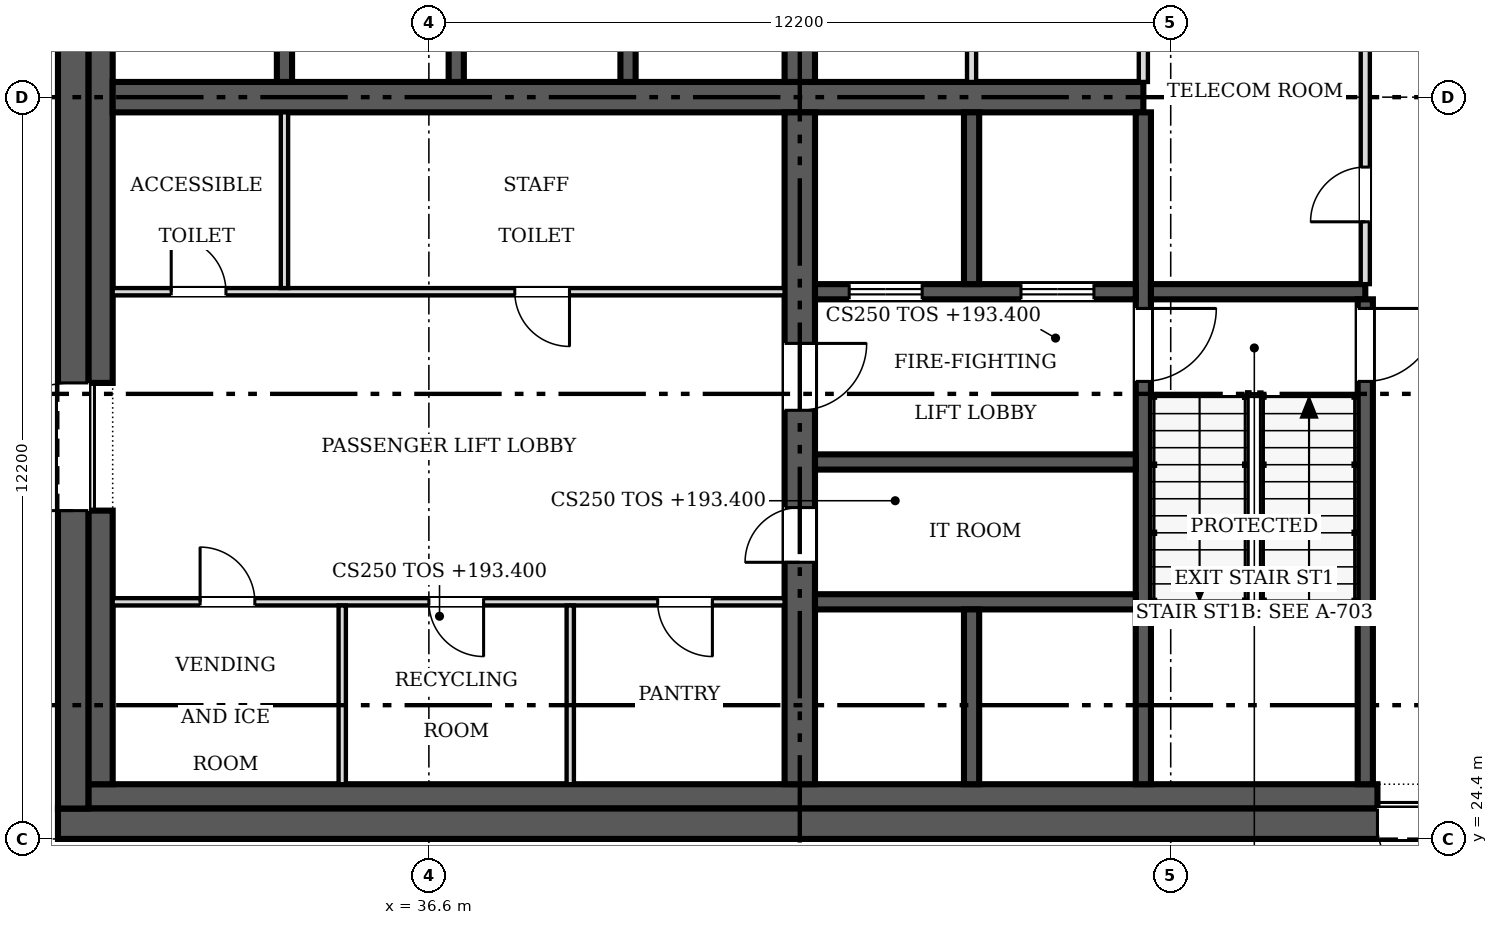
"""IFC4 building model, lengths in metres.
Left out: names, types, materials, properties, quantities, classifications, styles, units other than length and angle.
Written with IfcOpenShell. Run it as: python <this file> out.ifc"""

import sys

from ifc_helpers import new_model, si_unit, direction, frame, frame_2d, origin, place, context, subcontext, project, spatial, rectangle, extrude, source, transform, mapped, element, fill, save


model = new_model("IFC4")
c1 = context("Model", 3, precision=1e-05, world=origin(), true_north=direction((0.0, 1.0)))
c2 = subcontext(c1, "Body", "Model", "MODEL_VIEW")
j1 = project(units=[si_unit("LENGTHUNIT", "METRE"), si_unit("PLANEANGLEUNIT", "RADIAN")], contexts=[c1])
p1 = place(None, origin())
s1 = spatial("IfcSite", under=j1, at=p1, CompositionType="ELEMENT")
p2 = place(p1, origin())
s2 = spatial("IfcBuilding", under=s1, at=p2, CompositionType="ELEMENT")
p3 = place(p2, frame((0.0, 0.0, 193.4)))
s3 = spatial("IfcBuildingStorey", under=s2, at=p3, CompositionType="ELEMENT", Elevation=193.4)
p4 = place(p3, frame((54.9, 24.65, 0.0), z_axis=(0.0, 0.0, 1.0), x_axis=(-1.0, 0.0, 0.0)))
e1 = element("IfcWall", 1, at=p4, inside=s3, PredefinedType="SHEAR", context=c2, shape_type="SweptSolid", body=[
    extrude(rectangle(XDim=24.4, YDim=0.5, at=frame_2d((12.2, 0.0))), origin(), (0.0, 0.0, 1.0), 4.5),
])
m1 = source(origin(), c2, "Body", "SweptSolid", [
    extrude(rectangle(XDim=1.2, YDim=2.1, at=frame_2d((0.6, 1.05))), frame((0.0, 0.26, 0.0), z_axis=(0.0, -1.0, 0.0), x_axis=(1.0, 0.0, 0.0)), (0.0, 0.0, 1.0), 0.52),
])
p5 = place(p4, frame((1.5, 0.0, 0.0)))
e2 = element("IfcOpeningElement", 2, at=p5, cuts=e1, PredefinedType="OPENING", context=c2, shape_type="MappedRepresentation", body=[
    mapped(m1, transform((0.0, 0.0, 0.0), scale=1.0)),
])
p6 = place(p3, frame((30.75, 24.9, 0.0), z_axis=(0.0, 0.0, 1.0), x_axis=(0.0, 1.0, 0.0)))
e3 = element("IfcWall", 3, at=p6, inside=s3, PredefinedType="SHEAR", context=c2, shape_type="SweptSolid", body=[
    extrude(rectangle(XDim=23.4, YDim=0.5, at=frame_2d((11.7, 0.0))), origin(), (0.0, 0.0, 1.0), 4.5),
])
m2 = source(origin(), c2, "Body", "SweptSolid", [
    extrude(rectangle(XDim=2.1, YDim=2.4, at=frame_2d((1.05, 1.2))), frame((0.0, 0.26, 0.0), z_axis=(0.0, -1.0, 0.0), x_axis=(1.0, 0.0, 0.0)), (0.0, 0.0, 1.0), 0.52),
])
p7 = place(p6, frame((4.9, 0.0, 0.0)))
e4 = element("IfcOpeningElement", 4, at=p7, cuts=e3, PredefinedType="OPENING", context=c2, shape_type="MappedRepresentation", body=[
    mapped(m2, transform((0.0, 0.0, 0.0), scale=1.0)),
])
p8 = place(p6, frame((16.4, 0.0, 0.0)))
e5 = element("IfcOpeningElement", 5, at=p8, cuts=e3, PredefinedType="OPENING", context=c2, shape_type="MappedRepresentation", body=[
    mapped(m2, transform((0.0, 0.0, 0.0), scale=1.0)),
])
p9 = place(p3, frame((31.0, 25.1, 0.0), z_axis=(0.0, 0.0, 1.0), x_axis=(1.0, 0.0, 0.0)))
e6 = element("IfcWall", 6, at=p9, inside=s3, PredefinedType="SOLIDWALL", context=c2, shape_type="SweptSolid", body=[
    extrude(rectangle(XDim=21.2, YDim=0.4, at=frame_2d((10.6, 0.0))), origin(), (0.0, 0.0, 1.0), 4.5),
])
p10 = place(p3, frame((31.2, 25.3, 0.0), z_axis=(0.0, 0.0, 1.0), x_axis=(0.0, 1.0, 0.0)))
e7 = element("IfcWall", 7, at=p10, inside=s3, PredefinedType="SOLIDWALL", context=c2, shape_type="SweptSolid", body=[
    extrude(rectangle(XDim=4.5, YDim=0.4, at=frame_2d((2.25, 0.0))), origin(), (0.0, 0.0, 1.0), 4.5),
])
p11 = place(p3, frame((31.2, 31.9, 0.0), z_axis=(0.0, 0.0, 1.0), x_axis=(0.0, 1.0, 0.0)))
e8 = element("IfcWall", 8, at=p11, inside=s3, PredefinedType="SOLIDWALL", context=c2, shape_type="SweptSolid", body=[
    extrude(rectangle(XDim=9.4, YDim=0.4, at=frame_2d((4.7, 0.0))), origin(), (0.0, 0.0, 1.0), 4.5),
])
p12 = place(p3, frame((31.4, 36.6, 0.0), z_axis=(0.0, 0.0, 1.0), x_axis=(1.0, 0.0, 0.0)))
e9 = element("IfcWall", 9, at=p12, inside=s3, PredefinedType="SHEAR", context=c2, shape_type="SweptSolid", body=[
    extrude(rectangle(XDim=16.95, YDim=0.5, at=frame_2d((8.475, 0.0))), origin(), (0.0, 0.0, 1.0), 4.5),
])
p13 = place(p3, frame((42.7, 36.35, 0.0), z_axis=(0.0, 0.0, 1.0), x_axis=(0.0, -1.0, 0.0)))
e10 = element("IfcWall", 10, at=p13, inside=s3, PredefinedType="SHEAR", context=c2, shape_type="SweptSolid", body=[
    extrude(rectangle(XDim=11.05, YDim=0.5, at=frame_2d((5.525, 0.0))), origin(), (0.0, 0.0, 1.0), 4.5),
])
m3 = source(origin(), c2, "Body", "SweptSolid", [
    extrude(rectangle(XDim=0.9, YDim=2.1, at=frame_2d((0.45, 1.05))), frame((0.0, 0.26, 0.0), z_axis=(0.0, -1.0, 0.0), x_axis=(1.0, 0.0, 0.0)), (0.0, 0.0, 1.0), 0.52),
])
p14 = place(p13, frame((6.5, 0.0, 0.0)))
e11 = element("IfcOpeningElement", 11, at=p14, cuts=e10, PredefinedType="OPENING", context=c2, shape_type="MappedRepresentation", body=[
    mapped(m3, transform((0.0, 0.0, 0.0), scale=1.0)),
])
m4 = source(origin(), c2, "Body", "SweptSolid", [
    extrude(rectangle(XDim=1.1, YDim=2.1, at=frame_2d((0.55, 1.05))), frame((0.0, 0.26, 0.0), z_axis=(0.0, -1.0, 0.0), x_axis=(1.0, 0.0, 0.0)), (0.0, 0.0, 1.0), 0.52),
])
p15 = place(p13, frame((3.8, 0.0, 0.0)))
e12 = element("IfcOpeningElement", 12, at=p15, cuts=e10, PredefinedType="OPENING", context=c2, shape_type="MappedRepresentation", body=[
    mapped(m4, transform((0.0, 0.0, 0.0), scale=1.0)),
])
p16 = place(p3, frame((42.7, 36.85, 0.0), z_axis=(0.0, 0.0, 1.0), x_axis=(0.0, 1.0, 0.0)))
e13 = element("IfcWall", 13, at=p16, inside=s3, PredefinedType="SHEAR", context=c2, shape_type="SweptSolid", body=[
    extrude(rectangle(XDim=2.95, YDim=0.5, at=frame_2d((1.475, 0.0))), origin(), (0.0, 0.0, 1.0), 4.5),
])
p17 = place(p3, frame((48.35, 36.35, 0.0), z_axis=(0.0, 0.0, 1.0), x_axis=(0.0, -1.0, 0.0)))
e14 = element("IfcWall", 14, at=p17, inside=s3, PredefinedType="SOLIDWALL", context=c2, shape_type="SweptSolid", body=[
    extrude(rectangle(XDim=11.05, YDim=0.25, at=frame_2d((5.525, 0.0))), origin(), (0.0, 0.0, 1.0), 4.5),
])
m5 = source(origin(), c2, "Body", "SweptSolid", [
    extrude(rectangle(XDim=1.2, YDim=2.1, at=frame_2d((0.6, 1.05))), frame((0.0, 0.135, 0.0), z_axis=(0.0, -1.0, 0.0), x_axis=(1.0, 0.0, 0.0)), (0.0, 0.0, 1.0), 0.27),
])
p18 = place(p17, frame((3.225, 0.0, 0.0)))
e15 = element("IfcOpeningElement", 15, at=p18, cuts=e14, PredefinedType="OPENING", context=c2, shape_type="MappedRepresentation", body=[
    mapped(m5, transform((0.0, 0.0, 0.0), scale=1.0)),
])
p19 = place(p3, frame((48.225, 33.4, 0.0), z_axis=(0.0, 0.0, 1.0), x_axis=(-1.0, 0.0, 0.0)))
e16 = element("IfcWall", 16, at=p19, inside=s3, PredefinedType="SOLIDWALL", context=c2, shape_type="SweptSolid", body=[
    extrude(rectangle(XDim=5.275, YDim=0.25, at=frame_2d((2.638, 0.0))), origin(), (0.0, 0.0, 1.0), 4.5),
])
p20 = place(p19, frame((3.512, 0.0, 0.0)))
e17 = element("IfcOpeningElement", 17, at=p20, cuts=e16, PredefinedType="OPENING", context=c2, shape_type="MappedRepresentation", body=[
    mapped(m5, transform((0.0, 0.0, 0.0), scale=1.0)),
])
p21 = place(p19, frame((0.688, 0.0, 0.0)))
e18 = element("IfcOpeningElement", 18, at=p21, cuts=e16, PredefinedType="OPENING", context=c2, shape_type="MappedRepresentation", body=[
    mapped(m5, transform((0.0, 0.0, 0.0), scale=1.0)),
])
p22 = place(p3, frame((48.475, 33.4, 0.0), z_axis=(0.0, 0.0, 1.0), x_axis=(1.0, 0.0, 0.0)))
e19 = element("IfcWall", 19, at=p22, inside=s3, PredefinedType="SOLIDWALL", context=c2, shape_type="SweptSolid", body=[
    extrude(rectangle(XDim=3.525, YDim=0.25, at=frame_2d((1.762, 0.0))), origin(), (0.0, 0.0, 1.0), 4.5),
])
p23 = place(p3, frame((52.0, 25.3, 0.0), z_axis=(0.0, 0.0, 1.0), x_axis=(0.0, 1.0, 0.0)))
e20 = element("IfcWall", 20, at=p23, inside=s3, PredefinedType="SOLIDWALL", context=c2, shape_type="SweptSolid", body=[
    extrude(rectangle(XDim=7.975, YDim=0.25, at=frame_2d((3.987, 0.0))), origin(), (0.0, 0.0, 1.0), 4.5),
])
p24 = place(p23, frame((6.625, 0.0, 0.0)))
e21 = element("IfcOpeningElement", 21, at=p24, cuts=e20, PredefinedType="OPENING", context=c2, shape_type="MappedRepresentation", body=[
    mapped(m5, transform((0.0, 0.0, 0.0), scale=1.0)),
])
for number, where, z_axis, x_axis in (
    (22, (42.95, 28.3, 0.0), (0.0, 0.0, 1.0), (1.0, 0.0, 0.0)),
    (23, (42.95, 30.6, 0.0), (0.0, 0.0, 1.0), (1.0, 0.0, 0.0)),
):
    element("IfcWall", number, at=place(p3, frame(where, z_axis=z_axis, x_axis=x_axis)), inside=s3, PredefinedType="SOLIDWALL", context=c2, shape_type="SweptSolid", body=[
        extrude(rectangle(XDim=5.275, YDim=0.25, at=frame_2d((2.638, 0.0))), origin(), (0.0, 0.0, 1.0), 4.5),
    ])
for number, where, z_axis, x_axis in (
    (24, (34.225, 36.85, 0.0), (0.0, 0.0, 1.0), (0.0, 1.0, 0.0)),
    (25, (37.05, 36.85, 0.0), (0.0, 0.0, 1.0), (0.0, 1.0, 0.0)),
    (26, (39.875, 36.85, 0.0), (0.0, 0.0, 1.0), (0.0, 1.0, 0.0)),
):
    element("IfcWall", number, at=place(p3, frame(where, z_axis=z_axis, x_axis=x_axis)), inside=s3, PredefinedType="SOLIDWALL", context=c2, shape_type="SweptSolid", body=[
        extrude(rectangle(XDim=2.825, YDim=0.25, at=frame_2d((1.413, 0.0))), origin(), (0.0, 0.0, 1.0), 4.5),
    ])
p25 = place(p3, frame((45.525, 33.525, 0.0), z_axis=(0.0, 0.0, 1.0), x_axis=(0.0, 1.0, 0.0)))
e27 = element("IfcWall", 27, at=p25, inside=s3, PredefinedType="SOLIDWALL", context=c2, shape_type="SweptSolid", body=[
    extrude(rectangle(XDim=2.825, YDim=0.25, at=frame_2d((1.413, 0.0))), origin(), (0.0, 0.0, 1.0), 4.5),
])
p26 = place(p3, frame((45.525, 25.3, 0.0), z_axis=(0.0, 0.0, 1.0), x_axis=(0.0, 1.0, 0.0)))
e28 = element("IfcWall", 28, at=p26, inside=s3, PredefinedType="SOLIDWALL", context=c2, shape_type="SweptSolid", body=[
    extrude(rectangle(XDim=2.875, YDim=0.25, at=frame_2d((1.438, 0.0))), origin(), (0.0, 0.0, 1.0), 4.5),
])
p27 = place(p3, frame((42.45, 28.3, 0.0), z_axis=(0.0, 0.0, 1.0), x_axis=(-1.0, 0.0, 0.0)))
e29 = element("IfcWall", 29, at=p27, inside=s3, PredefinedType="PARTITIONING", context=c2, shape_type="SweptSolid", body=[
    extrude(rectangle(XDim=11.05, YDim=0.12, at=frame_2d((5.525, 0.0))), origin(), (0.0, 0.0, 1.0), 4.3),
])
m6 = source(origin(), c2, "Body", "SweptSolid", [
    extrude(rectangle(XDim=0.9, YDim=2.1, at=frame_2d((0.45, 1.05))), frame((0.0, 0.07, 0.0), z_axis=(0.0, -1.0, 0.0), x_axis=(1.0, 0.0, 0.0)), (0.0, 0.0, 1.0), 0.14),
])
p28 = place(p27, frame((8.712, 0.0, 0.0)))
e30 = element("IfcOpeningElement", 30, at=p28, cuts=e29, PredefinedType="OPENING", context=c2, shape_type="MappedRepresentation", body=[
    mapped(m6, transform((0.0, 0.0, 0.0), scale=1.0)),
])
p29 = place(p27, frame((4.95, 0.0, 0.0)))
e31 = element("IfcOpeningElement", 31, at=p29, cuts=e29, PredefinedType="OPENING", context=c2, shape_type="MappedRepresentation", body=[
    mapped(m6, transform((0.0, 0.0, 0.0), scale=1.0)),
])
p30 = place(p27, frame((1.188, 0.0, 0.0)))
e32 = element("IfcOpeningElement", 32, at=p30, cuts=e29, PredefinedType="OPENING", context=c2, shape_type="MappedRepresentation", body=[
    mapped(m6, transform((0.0, 0.0, 0.0), scale=1.0)),
])
p31 = place(p3, frame((31.4, 33.4, 0.0), z_axis=(0.0, 0.0, 1.0), x_axis=(1.0, 0.0, 0.0)))
e33 = element("IfcWall", 33, at=p31, inside=s3, PredefinedType="PARTITIONING", context=c2, shape_type="SweptSolid", body=[
    extrude(rectangle(XDim=11.05, YDim=0.12, at=frame_2d((5.525, 0.0))), origin(), (0.0, 0.0, 1.0), 4.3),
])
p32 = place(p31, frame((0.962, 0.0, 0.0)))
e34 = element("IfcOpeningElement", 34, at=p32, cuts=e33, PredefinedType="OPENING", context=c2, shape_type="MappedRepresentation", body=[
    mapped(m6, transform((0.0, 0.0, 0.0), scale=1.0)),
])
p33 = place(p31, frame((6.613, 0.0, 0.0)))
e35 = element("IfcOpeningElement", 35, at=p33, cuts=e33, PredefinedType="OPENING", context=c2, shape_type="MappedRepresentation", body=[
    mapped(m6, transform((0.0, 0.0, 0.0), scale=1.0)),
])
p34 = place(p3, frame((52.0, 33.525, 0.0), z_axis=(0.0, 0.0, 1.0), x_axis=(0.0, 1.0, 0.0)))
e36 = element("IfcWall", 36, at=p34, inside=s3, PredefinedType="PARTITIONING", context=c2, shape_type="SweptSolid", body=[
    extrude(rectangle(XDim=6.275, YDim=0.15, at=frame_2d((3.138, 0.0))), origin(), (0.0, 0.0, 1.0), 4.3),
])
m7 = source(origin(), c2, "Body", "SweptSolid", [
    extrude(rectangle(XDim=0.9, YDim=2.1, at=frame_2d((0.45, 1.05))), frame((0.0, 0.085, 0.0), z_axis=(0.0, -1.0, 0.0), x_axis=(1.0, 0.0, 0.0)), (0.0, 0.0, 1.0), 0.17),
])
p35 = place(p34, frame((1.025, 0.0, 0.0)))
e37 = element("IfcOpeningElement", 37, at=p35, cuts=e36, PredefinedType="OPENING", context=c2, shape_type="MappedRepresentation", body=[
    mapped(m7, transform((0.0, 0.0, 0.0), scale=1.0)),
])
for number, where, z_axis, x_axis in (
    (38, (45.525, 36.85, 0.0), (0.0, 0.0, 1.0), (0.0, 1.0, 0.0)),
    (39, (48.35, 36.85, 0.0), (0.0, 0.0, 1.0), (0.0, 1.0, 0.0)),
):
    element("IfcWall", number, at=place(p3, frame(where, z_axis=z_axis, x_axis=x_axis)), inside=s3, PredefinedType="PARTITIONING", context=c2, shape_type="SweptSolid", body=[
        extrude(rectangle(XDim=2.95, YDim=0.15, at=frame_2d((1.475, 0.0))), origin(), (0.0, 0.0, 1.0), 4.3),
    ])
p36 = place(p3, frame((34.225, 33.46, 0.0), z_axis=(0.0, 0.0, 1.0), x_axis=(0.0, 1.0, 0.0)))
e40 = element("IfcWall", 40, at=p36, inside=s3, PredefinedType="PARTITIONING", context=c2, shape_type="SweptSolid", body=[
    extrude(rectangle(XDim=2.89, YDim=0.12, at=frame_2d((1.445, 0.0))), origin(), (0.0, 0.0, 1.0), 4.3),
])
for number, where, z_axis, x_axis in (
    (41, (35.175, 25.3, 0.0), (0.0, 0.0, 1.0), (0.0, 1.0, 0.0)),
    (42, (38.925, 25.3, 0.0), (0.0, 0.0, 1.0), (0.0, 1.0, 0.0)),
):
    element("IfcWall", number, at=place(p3, frame(where, z_axis=z_axis, x_axis=x_axis)), inside=s3, PredefinedType="PARTITIONING", context=c2, shape_type="SweptSolid", body=[
        extrude(rectangle(XDim=2.94, YDim=0.12, at=frame_2d((1.47, 0.0))), origin(), (0.0, 0.0, 1.0), 4.3),
    ])
m8 = source(origin(), c2, "Body", "SweptSolid", [
    extrude(rectangle(XDim=1.2, YDim=2.1, at=frame_2d((0.6, 1.05))), frame((0.0, 0.025, 0.0), z_axis=(0.0, -1.0, 0.0), x_axis=(1.0, 0.0, 0.0)), (0.0, 0.0, 1.0), 0.05),
])
p37 = place(p5, origin())
e43 = element("IfcDoor", 43, at=p37, inside=s3, OperationType="SINGLE_SWING_LEFT", PredefinedType="DOOR", context=c2, shape_type="MappedRepresentation", body=[
    mapped(m8, transform((0.0, 0.0, 0.0), scale=1.0)),
])
fill(e2, e43)
m9 = source(origin(), c2, "Body", "SweptSolid", [
    extrude(rectangle(XDim=2.1, YDim=2.4, at=frame_2d((1.05, 1.2))), frame((0.0, 0.025, 0.0), z_axis=(0.0, -1.0, 0.0), x_axis=(1.0, 0.0, 0.0)), (0.0, 0.0, 1.0), 0.05),
])
p38 = place(p7, origin())
e44 = element("IfcDoor", 44, at=p38, inside=s3, OperationType="DOUBLE_DOOR_SINGLE_SWING", PredefinedType="DOOR", context=c2, shape_type="MappedRepresentation", body=[
    mapped(m9, transform((0.0, 0.0, 0.0), scale=1.0)),
])
fill(e4, e44)
m10 = source(origin(), c2, "Body", "SweptSolid", [
    extrude(rectangle(XDim=0.9, YDim=2.1, at=frame_2d((0.45, 1.05))), frame((0.0, 0.025, 0.0), z_axis=(0.0, -1.0, 0.0), x_axis=(1.0, 0.0, 0.0)), (0.0, 0.0, 1.0), 0.05),
])
p39 = place(p14, origin())
e45 = element("IfcDoor", 45, at=p39, inside=s3, OperationType="SINGLE_SWING_RIGHT", PredefinedType="DOOR", context=c2, shape_type="MappedRepresentation", body=[
    mapped(m10, transform((0.0, 0.0, 0.0), scale=1.0)),
])
fill(e11, e45)
m11 = source(origin(), c2, "Body", "SweptSolid", [
    extrude(rectangle(XDim=1.1, YDim=2.1, at=frame_2d((0.55, 1.05))), frame((0.0, 0.025, 0.0), z_axis=(0.0, -1.0, 0.0), x_axis=(1.0, 0.0, 0.0)), (0.0, 0.0, 1.0), 0.05),
])
p40 = place(p15, origin())
e46 = element("IfcDoor", 46, at=p40, inside=s3, OperationType="SINGLE_SWING_LEFT", PredefinedType="DOOR", context=c2, shape_type="MappedRepresentation", body=[
    mapped(m11, transform((0.0, 0.0, 0.0), scale=1.0)),
])
fill(e12, e46)
p41 = place(p18, origin())
e47 = element("IfcDoor", 47, at=p41, inside=s3, OperationType="SINGLE_SWING_LEFT", PredefinedType="DOOR", context=c2, shape_type="MappedRepresentation", body=[
    mapped(m8, transform((0.0, 0.0, 0.0), scale=1.0)),
])
fill(e15, e47)
p42 = place(p20, origin())
e48 = element("IfcDoor", 48, at=p42, inside=s3, OperationType="DOUBLE_DOOR_SLIDING", PredefinedType="DOOR", context=c2, shape_type="MappedRepresentation", body=[
    mapped(m8, transform((0.0, 0.0, 0.0), scale=1.0)),
])
fill(e17, e48)
p43 = place(p21, origin())
e49 = element("IfcDoor", 49, at=p43, inside=s3, OperationType="DOUBLE_DOOR_SLIDING", PredefinedType="DOOR", context=c2, shape_type="MappedRepresentation", body=[
    mapped(m8, transform((0.0, 0.0, 0.0), scale=1.0)),
])
fill(e18, e49)
p44 = place(p24, origin())
e50 = element("IfcDoor", 50, at=p44, inside=s3, OperationType="SINGLE_SWING_RIGHT", PredefinedType="DOOR", context=c2, shape_type="MappedRepresentation", body=[
    mapped(m8, transform((0.0, 0.0, 0.0), scale=1.0)),
])
fill(e21, e50)
p45 = place(p28, origin())
e51 = element("IfcDoor", 51, at=p45, inside=s3, OperationType="SINGLE_SWING_RIGHT", PredefinedType="DOOR", context=c2, shape_type="MappedRepresentation", body=[
    mapped(m10, transform((0.0, 0.0, 0.0), scale=1.0)),
])
fill(e30, e51)
p46 = place(p29, origin())
e52 = element("IfcDoor", 52, at=p46, inside=s3, OperationType="SINGLE_SWING_LEFT", PredefinedType="DOOR", context=c2, shape_type="MappedRepresentation", body=[
    mapped(m10, transform((0.0, 0.0, 0.0), scale=1.0)),
])
fill(e31, e52)
p47 = place(p30, origin())
e53 = element("IfcDoor", 53, at=p47, inside=s3, OperationType="SINGLE_SWING_LEFT", PredefinedType="DOOR", context=c2, shape_type="MappedRepresentation", body=[
    mapped(m10, transform((0.0, 0.0, 0.0), scale=1.0)),
])
fill(e32, e53)
p48 = place(p32, origin())
e54 = element("IfcDoor", 54, at=p48, inside=s3, OperationType="SINGLE_SWING_LEFT", PredefinedType="DOOR", context=c2, shape_type="MappedRepresentation", body=[
    mapped(m10, transform((0.0, 0.0, 0.0), scale=1.0)),
])
fill(e34, e54)
p49 = place(p33, origin())
e55 = element("IfcDoor", 55, at=p49, inside=s3, OperationType="SINGLE_SWING_RIGHT", PredefinedType="DOOR", context=c2, shape_type="MappedRepresentation", body=[
    mapped(m10, transform((0.0, 0.0, 0.0), scale=1.0)),
])
fill(e35, e55)
p50 = place(p35, origin())
e56 = element("IfcDoor", 56, at=p50, inside=s3, OperationType="SINGLE_SWING_LEFT", PredefinedType="DOOR", context=c2, shape_type="MappedRepresentation", body=[
    mapped(m10, transform((0.0, 0.0, 0.0), scale=1.0)),
])
fill(e37, e56)
save(model, sys.argv[1])
